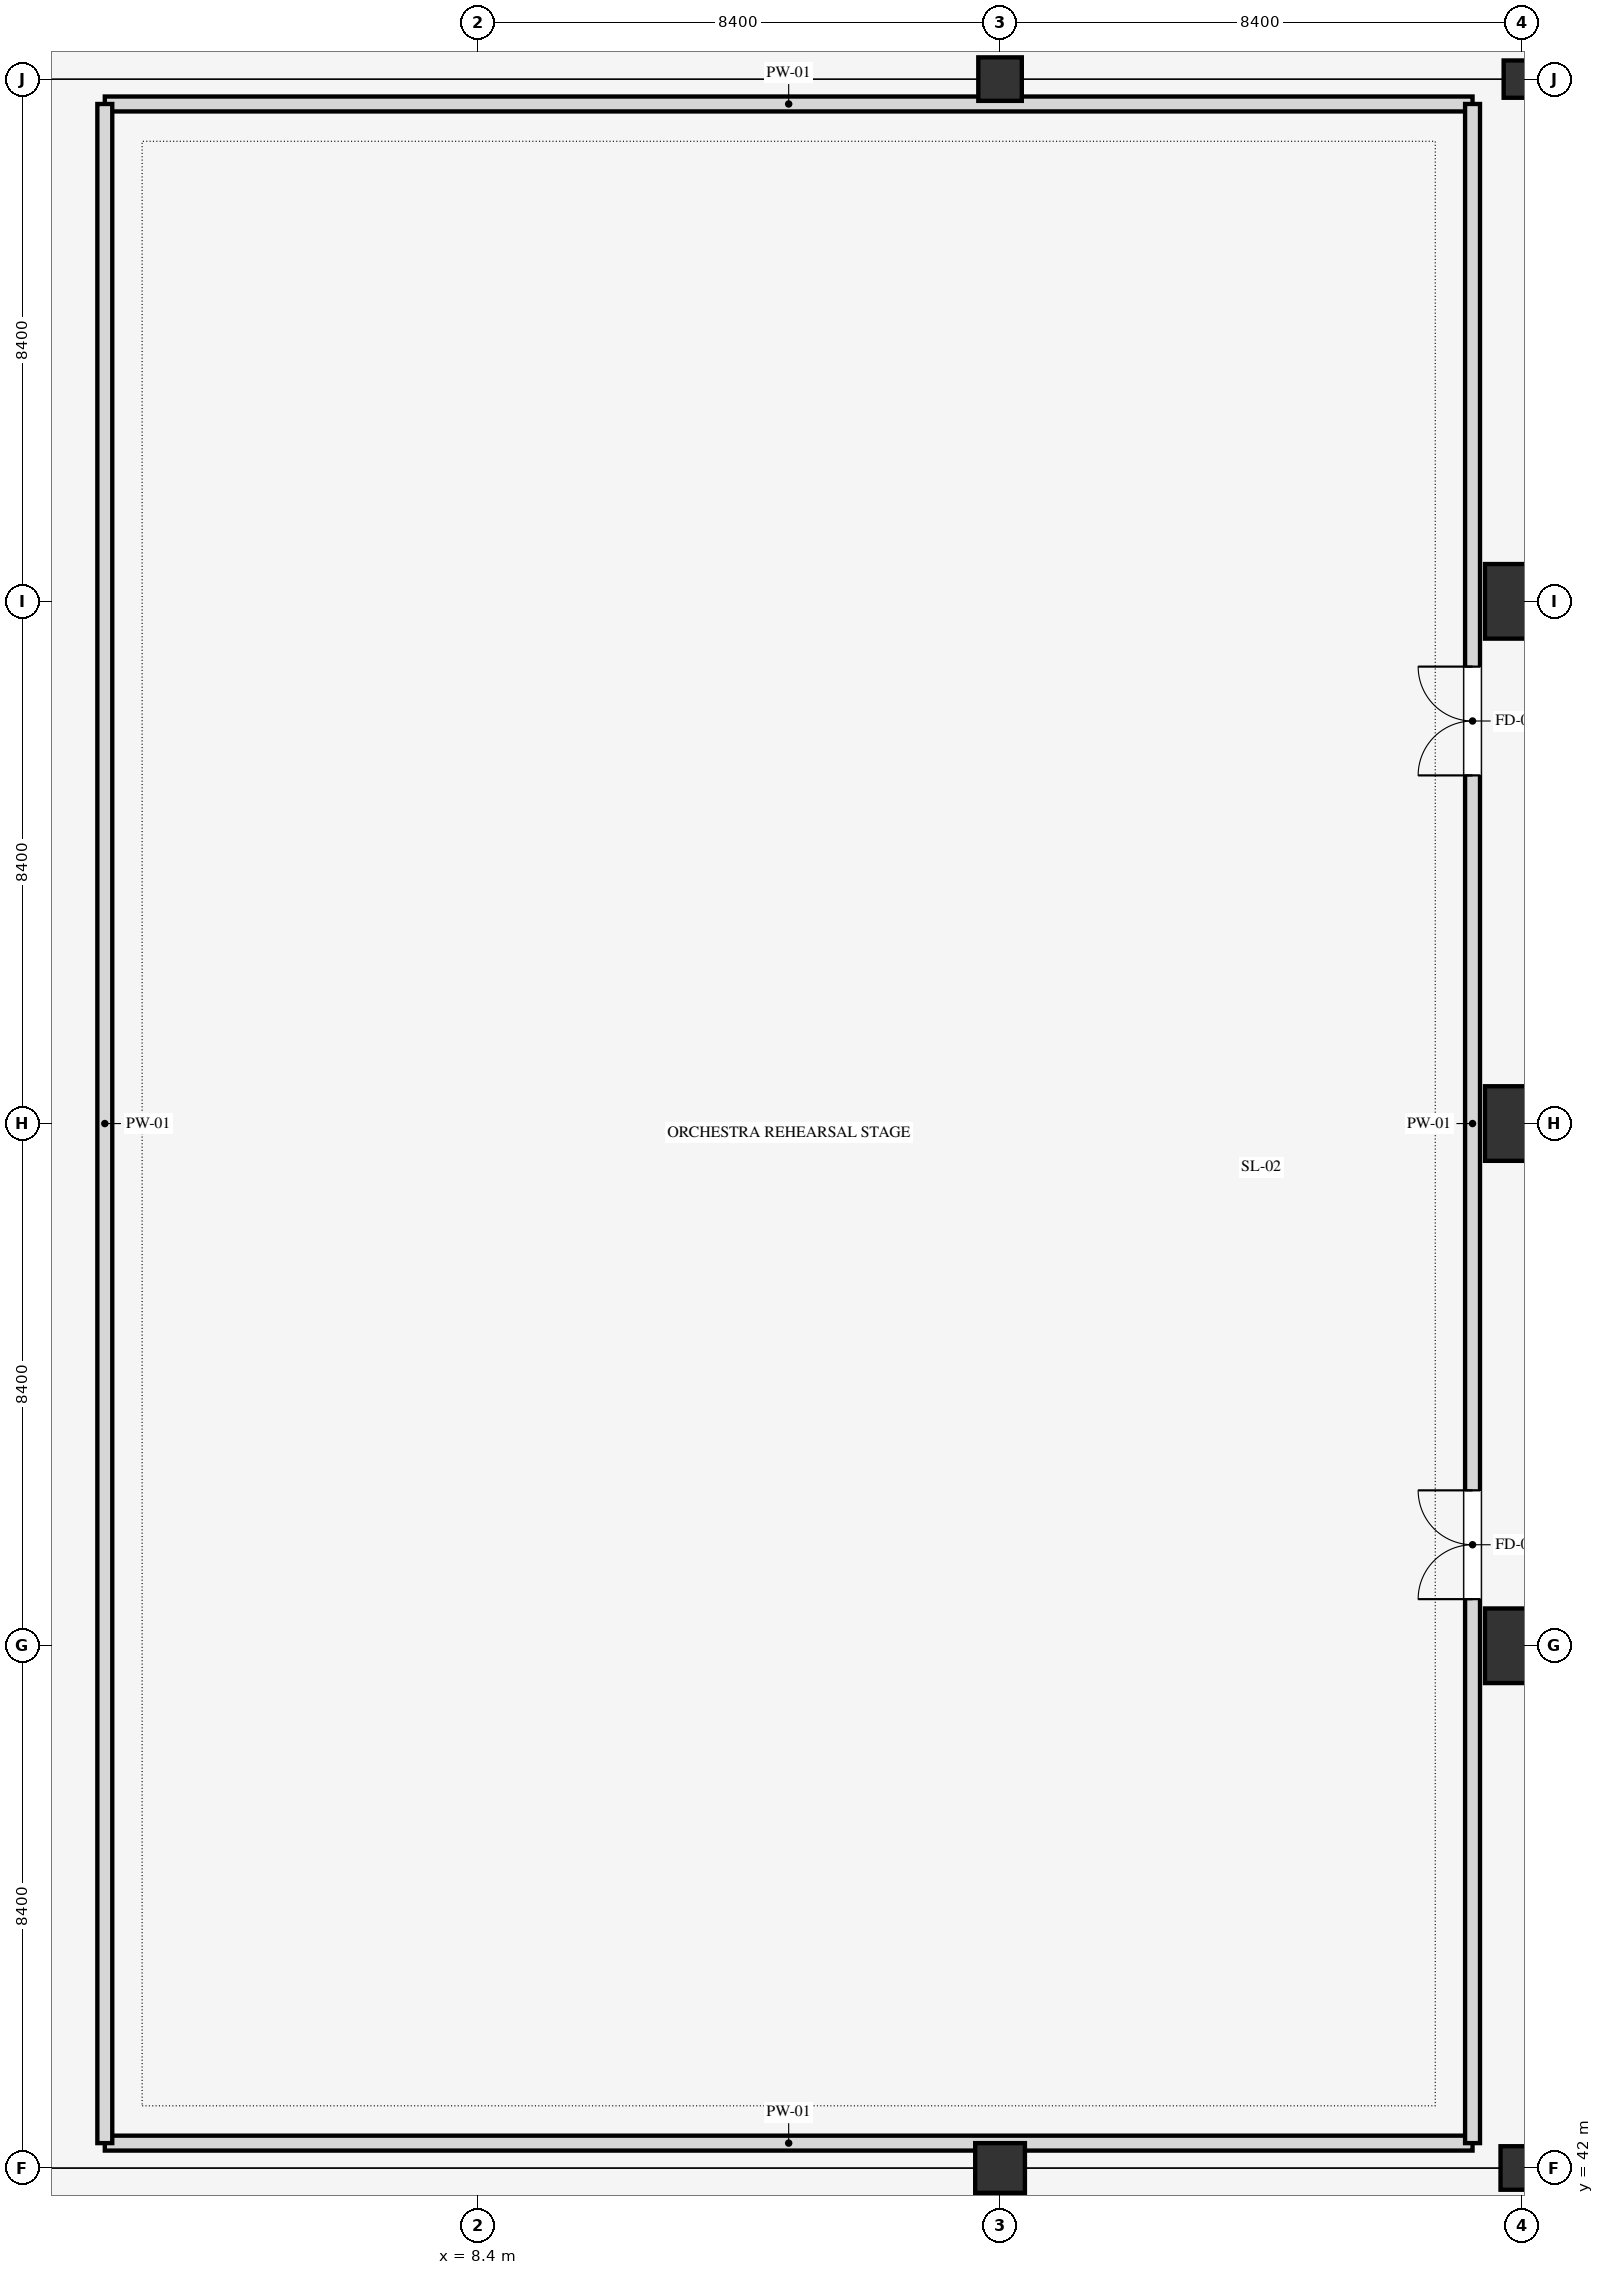
"""IFC4 building model, lengths in metres.
Left out: names, types, materials, properties, quantities, classifications, styles, units other than length and angle.
Written with IfcOpenShell. Run it as: python <this file> out.ifc"""

import sys

from ifc_helpers import new_model, si_unit, direction, frame, frame_2d, origin, origin_2d, place, context, subcontext, project, spatial, rectangle, extrude, element, fill, save


model = new_model("IFC4")
c1 = context("Model", 3, precision=1e-05, world=origin(), true_north=direction((0.0, 1.0)))
c2 = subcontext(c1, "Body", "Model", "MODEL_VIEW")
j1 = project(units=[si_unit("LENGTHUNIT", "METRE"), si_unit("PLANEANGLEUNIT", "RADIAN")], contexts=[c1])
p1 = place(None, origin())
s1 = spatial("IfcSite", under=j1, at=p1, CompositionType="ELEMENT")
p2 = place(p1, origin())
s2 = spatial("IfcBuilding", under=s1, at=p2, CompositionType="ELEMENT")
p3 = place(p2, frame((0.0, 0.0, 5.4)))
s3 = spatial("IfcBuildingStorey", under=s2, at=p3, CompositionType="ELEMENT", Elevation=5.4)
p4 = place(p3, frame((16.8, 42.0, 0.0), z_axis=(0.0, 0.0, 1.0), x_axis=(1.0, 0.0, 0.0)))
e1 = element("IfcColumn", 1, at=p4, inside=s3, PredefinedType="COLUMN", context=c2, shape_type="SweptSolid", body=[
    extrude(rectangle(XDim=0.8, YDim=0.8, at=origin_2d()), origin(), (0.0, 0.0, 1.0), 4.5),
])
for number, where, z_axis, x_axis in (
    (2, (16.8, 75.6, 0.0), (0.0, 0.0, 1.0), (1.0, 0.0, 0.0)),
    (3, (25.2, 42.0, 0.0), (0.0, 0.0, 1.0), (1.0, 0.0, 0.0)),
):
    element("IfcColumn", number, at=place(p3, frame(where, z_axis=z_axis, x_axis=x_axis)), inside=s3, PredefinedType="COLUMN", context=c2, shape_type="SweptSolid", body=[
        extrude(rectangle(XDim=0.7, YDim=0.7, at=origin_2d()), origin(), (0.0, 0.0, 1.0), 4.5),
    ])
for number, where, z_axis, x_axis in (
    (4, (25.2, 50.4, 0.0), (0.0, 0.0, 1.0), (1.0, 0.0, 0.0)),
    (5, (25.2, 58.8, 0.0), (0.0, 0.0, 1.0), (1.0, 0.0, 0.0)),
    (6, (25.2, 67.2, 0.0), (0.0, 0.0, 1.0), (1.0, 0.0, 0.0)),
):
    element("IfcColumn", number, at=place(p3, frame(where, z_axis=z_axis, x_axis=x_axis)), inside=s3, PredefinedType="COLUMN", context=c2, shape_type="SweptSolid", body=[
        extrude(rectangle(XDim=1.2, YDim=1.2, at=origin_2d()), origin(), (0.0, 0.0, 1.0), 4.5),
    ])
p5 = place(p3, frame((25.2, 75.6, 0.0), z_axis=(0.0, 0.0, 1.0), x_axis=(1.0, 0.0, 0.0)))
e7 = element("IfcColumn", 7, at=p5, inside=s3, PredefinedType="COLUMN", context=c2, shape_type="SweptSolid", body=[
    extrude(rectangle(XDim=0.6, YDim=0.6, at=origin_2d()), origin(), (0.0, 0.0, 1.0), 4.5),
])
for number, where, z_axis, x_axis in (
    (8, (2.4, 42.4, 0.0), (0.0, 0.0, 1.0), (1.0, 0.0, 0.0)),
    (9, (2.4, 75.2, 0.0), (0.0, 0.0, 1.0), (1.0, 0.0, 0.0)),
):
    element("IfcWall", number, at=place(p3, frame(where, z_axis=z_axis, x_axis=x_axis)), inside=s3, PredefinedType="PARTITIONING", context=c2, shape_type="SweptSolid", body=[
        extrude(rectangle(XDim=22.0, YDim=0.24, at=frame_2d((11.0, 0.0))), origin(), (0.0, 0.0, 1.0), 3.54),
    ])
p6 = place(p3, frame((2.4, 42.4, 0.0), z_axis=(0.0, 0.0, 1.0), x_axis=(0.0, 1.0, 0.0)))
e10 = element("IfcWall", 10, at=p6, inside=s3, PredefinedType="PARTITIONING", context=c2, shape_type="SweptSolid", body=[
    extrude(rectangle(XDim=32.8, YDim=0.24, at=frame_2d((16.4, 0.0))), origin(), (0.0, 0.0, 1.0), 3.54),
])
p7 = place(p3, frame((24.4, 42.4, 0.0), z_axis=(0.0, 0.0, 1.0), x_axis=(0.0, 1.0, 0.0)))
e11 = element("IfcWall", 11, at=p7, inside=s3, PredefinedType="PARTITIONING", context=c2, shape_type="SweptSolid", body=[
    extrude(rectangle(XDim=32.8, YDim=0.24, at=frame_2d((16.4, 0.0))), origin(), (0.0, 0.0, 1.0), 3.54),
])
p8 = place(p7, frame((8.75, 0.0, 0.0)))
e12 = element("IfcOpeningElement", 12, at=p8, cuts=e11, PredefinedType="OPENING", context=c2, shape_type="SweptSolid", body=[
    extrude(rectangle(XDim=1.75, YDim=2.2, at=frame_2d((0.875, 1.1))), frame((0.0, 0.13, 0.0), z_axis=(0.0, -1.0, 0.0), x_axis=(1.0, 0.0, 0.0)), (0.0, 0.0, 1.0), 0.26),
])
p9 = place(p7, frame((22.0, 0.0, 0.0)))
e13 = element("IfcOpeningElement", 13, at=p9, cuts=e11, PredefinedType="OPENING", context=c2, shape_type="SweptSolid", body=[
    extrude(rectangle(XDim=1.75, YDim=2.2, at=frame_2d((0.875, 1.1))), frame((0.0, 0.13, 0.0), z_axis=(0.0, -1.0, 0.0), x_axis=(1.0, 0.0, 0.0)), (0.0, 0.0, 1.0), 0.26),
])
p10 = place(p8, origin())
e14 = element("IfcDoor", 14, at=p10, inside=s3, OperationType="DOUBLE_DOOR_SINGLE_SWING", PredefinedType="DOOR", context=c2, shape_type="SweptSolid", body=[
    extrude(rectangle(XDim=1.75, YDim=2.2, at=frame_2d((0.875, 1.1))), frame((0.0, 0.025, 0.0), z_axis=(0.0, -1.0, 0.0), x_axis=(1.0, 0.0, 0.0)), (0.0, 0.0, 1.0), 0.05),
])
fill(e12, e14)
p11 = place(p9, origin())
e15 = element("IfcDoor", 15, at=p11, inside=s3, OperationType="DOUBLE_DOOR_SINGLE_SWING", PredefinedType="DOOR", context=c2, shape_type="SweptSolid", body=[
    extrude(rectangle(XDim=1.75, YDim=2.2, at=frame_2d((0.875, 1.1))), frame((0.0, 0.025, 0.0), z_axis=(0.0, -1.0, 0.0), x_axis=(1.0, 0.0, 0.0)), (0.0, 0.0, 1.0), 0.05),
])
fill(e13, e15)
save(model, sys.argv[1])
